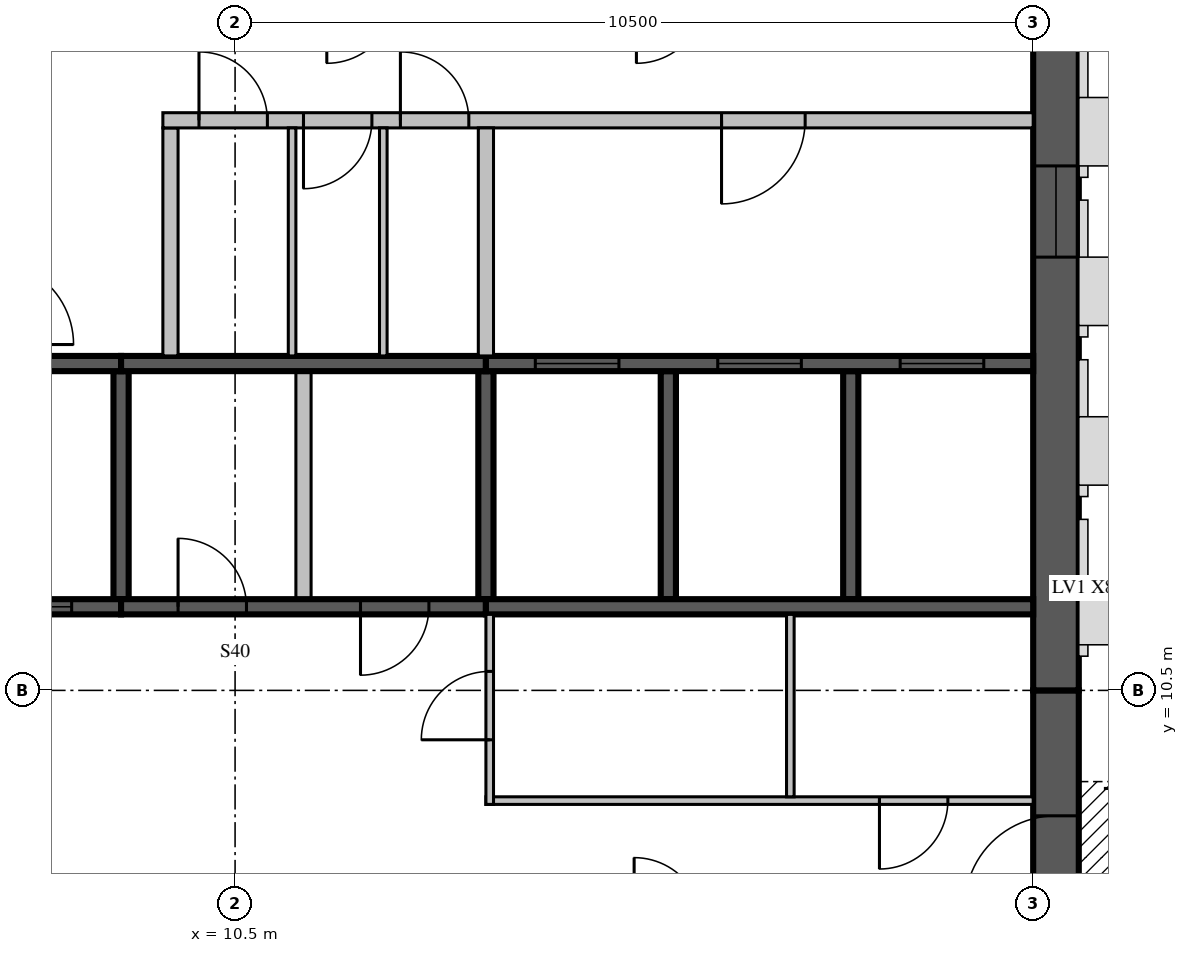
"""IFC4 building model, lengths in metres.
Left out: names, types, materials, properties, quantities, classifications, styles, units other than length and angle.
Written with IfcOpenShell. Run it as: python <this file> out.ifc"""

import sys

from ifc_helpers import new_model, si_unit, direction, frame, frame_2d, origin, place, context, subcontext, project, spatial, rectangle, extrude, source, transform, mapped, element, fill, save


model = new_model("IFC4")
c1 = context("Model", 3, precision=1e-05, world=origin(), true_north=direction((0.0, 1.0)))
c2 = subcontext(c1, "Body", "Model", "MODEL_VIEW")
j1 = project(units=[si_unit("LENGTHUNIT", "METRE"), si_unit("PLANEANGLEUNIT", "RADIAN")], contexts=[c1])
p1 = place(None, origin())
s1 = spatial("IfcSite", under=j1, at=p1, CompositionType="ELEMENT")
p2 = place(p1, origin())
s2 = spatial("IfcBuilding", under=s1, at=p2, CompositionType="ELEMENT")
p3 = place(p2, frame((0.0, 0.0, 295.0)))
s3 = spatial("IfcBuildingStorey", under=s2, at=p3, CompositionType="ELEMENT", Elevation=295.0)
m1 = source(origin(), c2, "Body", "SweptSolid", [
    extrude(rectangle(XDim=6.3, YDim=0.6, at=frame_2d((3.15, 0.0))), origin(), (0.0, 0.0, 1.0), 3.5),
])
p4 = place(p3, frame((21.3, 4.2, 0.0), z_axis=(0.0, 0.0, 1.0), x_axis=(0.0, 1.0, 0.0)))
e1 = element("IfcWall", 1, at=p4, inside=s3, PredefinedType="SHEAR", context=c2, shape_type="MappedRepresentation", body=[
    mapped(m1, transform((0.0, 0.0, 0.0), scale=1.0)),
])
m2 = source(origin(), c2, "Body", "SweptSolid", [
    extrude(rectangle(XDim=1.2, YDim=2.1, at=frame_2d((0.6, 1.05))), frame((0.0, 0.31, 0.0), z_axis=(0.0, -1.0, 0.0), x_axis=(1.0, 0.0, 0.0)), (0.0, 0.0, 1.0), 0.62),
])
p5 = place(p4, frame((3.45, 0.0, 0.0)))
e2 = element("IfcOpeningElement", 2, at=p5, cuts=e1, PredefinedType="OPENING", context=c2, shape_type="MappedRepresentation", body=[
    mapped(m2, transform((0.0, 0.0, 0.0), scale=1.0)),
])
m3 = source(origin(), c2, "Body", "SweptSolid", [
    extrude(rectangle(XDim=10.5, YDim=0.6, at=frame_2d((5.25, 0.0))), origin(), (0.0, 0.0, 1.0), 3.5),
])
p6 = place(p3, frame((21.3, 10.5, 0.0), z_axis=(0.0, 0.0, 1.0), x_axis=(0.0, 1.0, 0.0)))
e3 = element("IfcWall", 3, at=p6, inside=s3, PredefinedType="SHEAR", context=c2, shape_type="MappedRepresentation", body=[
    mapped(m3, transform((0.0, 0.0, 0.0), scale=1.0)),
])
m4 = source(origin(), c2, "Body", "SweptSolid", [
    extrude(rectangle(XDim=1.2, YDim=2.4, at=frame_2d((0.6, 1.2))), frame((0.0, 0.31, 0.0), z_axis=(0.0, -1.0, 0.0), x_axis=(1.0, 0.0, 0.0)), (0.0, 0.0, 1.0), 0.62),
])
p7 = place(p6, frame((5.7, 0.0, 0.6)))
e4 = element("IfcOpeningElement", 4, at=p7, cuts=e3, PredefinedType="OPENING", context=c2, shape_type="MappedRepresentation", body=[
    mapped(m4, transform((0.0, 0.0, 0.0), scale=1.0)),
])
m5 = source(origin(), c2, "Body", "SweptSolid", [
    extrude(rectangle(XDim=3.0, YDim=0.2, at=frame_2d((1.5, 0.0))), origin(), (0.0, 0.0, 1.0), 3.1),
])
for number, where, z_axis, x_axis in (
    (5, (9.0, 11.7, 0.0), (0.0, 0.0, 1.0), (0.0, 1.0, 0.0)),
    (6, (13.8, 11.7, 0.0), (0.0, 0.0, 1.0), (0.0, 1.0, 0.0)),
):
    element("IfcWall", number, at=place(p3, frame(where, z_axis=z_axis, x_axis=x_axis)), inside=s3, PredefinedType="SOLIDWALL", context=c2, shape_type="MappedRepresentation", body=[
        mapped(m5, transform((0.0, 0.0, 0.0), scale=1.0)),
    ])
m6 = source(origin(), c2, "Body", "SweptSolid", [
    extrude(rectangle(XDim=3.0, YDim=0.2, at=frame_2d((1.5, 0.0))), origin(), (0.0, 0.0, 1.0), 3.5),
])
for number, where, z_axis, x_axis in (
    (7, (16.2, 11.7, 0.0), (0.0, 0.0, 1.0), (0.0, 1.0, 0.0)),
    (8, (18.6, 11.7, 0.0), (0.0, 0.0, 1.0), (0.0, 1.0, 0.0)),
):
    element("IfcWall", number, at=place(p3, frame(where, z_axis=z_axis, x_axis=x_axis)), inside=s3, PredefinedType="SOLIDWALL", context=c2, shape_type="MappedRepresentation", body=[
        mapped(m6, transform((0.0, 0.0, 0.0), scale=1.0)),
    ])
m7 = source(origin(), c2, "Body", "SweptSolid", [
    extrude(rectangle(XDim=3.0, YDim=0.2, at=frame_2d((1.5, 0.0))), origin(), (0.0, 0.0, 1.0), 3.1),
])
p8 = place(p3, frame((11.4, 11.7, 0.0), z_axis=(0.0, 0.0, 1.0), x_axis=(0.0, 1.0, 0.0)))
e9 = element("IfcWall", 9, at=p8, inside=s3, PredefinedType="PARTITIONING", context=c2, shape_type="MappedRepresentation", body=[
    mapped(m7, transform((0.0, 0.0, 0.0), scale=1.0)),
])
m8 = source(origin(), c2, "Body", "SweptSolid", [
    extrude(rectangle(XDim=4.8, YDim=0.2, at=frame_2d((2.4, 0.0))), origin(), (0.0, 0.0, 1.0), 3.5),
])
p9 = place(p3, frame((4.2, 11.6, 0.0), z_axis=(0.0, 0.0, 1.0), x_axis=(1.0, 0.0, 0.0)))
e10 = element("IfcWall", 10, at=p9, inside=s3, PredefinedType="SOLIDWALL", context=c2, shape_type="MappedRepresentation", body=[
    mapped(m8, transform((0.0, 0.0, 0.0), scale=1.0)),
])
m9 = source(origin(), c2, "Body", "SweptSolid", [
    extrude(rectangle(XDim=1.1, YDim=2.1, at=frame_2d((0.55, 1.05))), frame((0.0, 0.11, 0.0), z_axis=(0.0, -1.0, 0.0), x_axis=(1.0, 0.0, 0.0)), (0.0, 0.0, 1.0), 0.22),
])
p10 = place(p9, frame((0.65, 0.0, 0.0)))
e11 = element("IfcOpeningElement", 11, at=p10, cuts=e10, PredefinedType="OPENING", context=c2, shape_type="MappedRepresentation", body=[
    mapped(m9, transform((0.0, 0.0, 0.0), scale=1.0)),
])
p11 = place(p9, frame((3.05, 0.0, 0.0)))
e12 = element("IfcOpeningElement", 12, at=p11, cuts=e10, PredefinedType="OPENING", context=c2, shape_type="MappedRepresentation", body=[
    mapped(m9, transform((0.0, 0.0, 0.0), scale=1.0)),
])
m10 = source(origin(), c2, "Body", "SweptSolid", [
    extrude(rectangle(XDim=4.8, YDim=0.2, at=frame_2d((2.4, 0.0))), origin(), (0.0, 0.0, 1.0), 3.1),
])
p12 = place(p3, frame((9.0, 11.6, 0.0), z_axis=(0.0, 0.0, 1.0), x_axis=(1.0, 0.0, 0.0)))
e13 = element("IfcWall", 13, at=p12, inside=s3, PredefinedType="SOLIDWALL", context=c2, shape_type="MappedRepresentation", body=[
    mapped(m10, transform((0.0, 0.0, 0.0), scale=1.0)),
])
m11 = source(origin(), c2, "Body", "SweptSolid", [
    extrude(rectangle(XDim=0.9, YDim=2.1, at=frame_2d((0.45, 1.05))), frame((0.0, 0.11, 0.0), z_axis=(0.0, -1.0, 0.0), x_axis=(1.0, 0.0, 0.0)), (0.0, 0.0, 1.0), 0.22),
])
p13 = place(p12, frame((0.75, 0.0, 0.0)))
e14 = element("IfcOpeningElement", 14, at=p13, cuts=e13, PredefinedType="OPENING", context=c2, shape_type="MappedRepresentation", body=[
    mapped(m11, transform((0.0, 0.0, 0.0), scale=1.0)),
])
p14 = place(p12, frame((3.15, 0.0, 0.0)))
e15 = element("IfcOpeningElement", 15, at=p14, cuts=e13, PredefinedType="OPENING", context=c2, shape_type="MappedRepresentation", body=[
    mapped(m11, transform((0.0, 0.0, 0.0), scale=1.0)),
])
m12 = source(origin(), c2, "Body", "SweptSolid", [
    extrude(rectangle(XDim=7.2, YDim=0.2, at=frame_2d((3.6, 0.0))), origin(), (0.0, 0.0, 1.0), 3.5),
])
p15 = place(p3, frame((13.8, 11.6, 0.0), z_axis=(0.0, 0.0, 1.0), x_axis=(1.0, 0.0, 0.0)))
e16 = element("IfcWall", 16, at=p15, inside=s3, PredefinedType="SOLIDWALL", context=c2, shape_type="MappedRepresentation", body=[
    mapped(m12, transform((0.0, 0.0, 0.0), scale=1.0)),
])
p16 = place(p3, frame((4.2, 14.8, 0.0), z_axis=(0.0, 0.0, 1.0), x_axis=(1.0, 0.0, 0.0)))
e17 = element("IfcWall", 17, at=p16, inside=s3, PredefinedType="SOLIDWALL", context=c2, shape_type="MappedRepresentation", body=[
    mapped(m8, transform((0.0, 0.0, 0.0), scale=1.0)),
])
p17 = place(p3, frame((9.0, 14.8, 0.0), z_axis=(0.0, 0.0, 1.0), x_axis=(1.0, 0.0, 0.0)))
e18 = element("IfcWall", 18, at=p17, inside=s3, PredefinedType="SOLIDWALL", context=c2, shape_type="MappedRepresentation", body=[
    mapped(m10, transform((0.0, 0.0, 0.0), scale=1.0)),
])
p18 = place(p3, frame((13.8, 14.8, 0.0), z_axis=(0.0, 0.0, 1.0), x_axis=(1.0, 0.0, 0.0)))
e19 = element("IfcWall", 19, at=p18, inside=s3, PredefinedType="SOLIDWALL", context=c2, shape_type="MappedRepresentation", body=[
    mapped(m12, transform((0.0, 0.0, 0.0), scale=1.0)),
])
p19 = place(p18, frame((0.65, 0.0, 0.0)))
e20 = element("IfcOpeningElement", 20, at=p19, cuts=e19, PredefinedType="OPENING", context=c2, shape_type="MappedRepresentation", body=[
    mapped(m9, transform((0.0, 0.0, 0.0), scale=1.0)),
])
p20 = place(p18, frame((3.05, 0.0, 0.0)))
e21 = element("IfcOpeningElement", 21, at=p20, cuts=e19, PredefinedType="OPENING", context=c2, shape_type="MappedRepresentation", body=[
    mapped(m9, transform((0.0, 0.0, 0.0), scale=1.0)),
])
p21 = place(p18, frame((5.45, 0.0, 0.0)))
e22 = element("IfcOpeningElement", 22, at=p21, cuts=e19, PredefinedType="OPENING", context=c2, shape_type="MappedRepresentation", body=[
    mapped(m9, transform((0.0, 0.0, 0.0), scale=1.0)),
])
p22 = place(p3, frame((9.65, 14.9, 0.0), z_axis=(0.0, 0.0, 1.0), x_axis=(0.0, 1.0, 0.0)))
e23 = element("IfcWall", 23, at=p22, inside=s3, PredefinedType="PARTITIONING", context=c2, shape_type="MappedRepresentation", body=[
    mapped(m7, transform((0.0, 0.0, 0.0), scale=1.0)),
])
m13 = source(origin(), c2, "Body", "SweptSolid", [
    extrude(rectangle(XDim=11.45, YDim=0.2, at=frame_2d((5.725, 0.0))), origin(), (0.0, 0.0, 1.0), 3.1),
])
p23 = place(p3, frame((9.55, 18.0, 0.0), z_axis=(0.0, 0.0, 1.0), x_axis=(1.0, 0.0, 0.0)))
e24 = element("IfcWall", 24, at=p23, inside=s3, PredefinedType="PARTITIONING", context=c2, shape_type="MappedRepresentation", body=[
    mapped(m13, transform((0.0, 0.0, 0.0), scale=1.0)),
])
p24 = place(p23, frame((0.475, 0.0, 0.0)))
e25 = element("IfcOpeningElement", 25, at=p24, cuts=e24, PredefinedType="OPENING", context=c2, shape_type="MappedRepresentation", body=[
    mapped(m11, transform((0.0, 0.0, 0.0), scale=1.0)),
])
p25 = place(p23, frame((1.85, 0.0, 0.0)))
e26 = element("IfcOpeningElement", 26, at=p25, cuts=e24, PredefinedType="OPENING", context=c2, shape_type="MappedRepresentation", body=[
    mapped(m11, transform((0.0, 0.0, 0.0), scale=1.0)),
])
p26 = place(p23, frame((3.125, 0.0, 0.0)))
e27 = element("IfcOpeningElement", 27, at=p26, cuts=e24, PredefinedType="OPENING", context=c2, shape_type="MappedRepresentation", body=[
    mapped(m11, transform((0.0, 0.0, 0.0), scale=1.0)),
])
p27 = place(p23, frame((7.35, 0.0, 0.0)))
e28 = element("IfcOpeningElement", 28, at=p27, cuts=e24, PredefinedType="OPENING", context=c2, shape_type="MappedRepresentation", body=[
    mapped(m9, transform((0.0, 0.0, 0.0), scale=1.0)),
])
p28 = place(p3, frame((13.8, 9.05, 0.0), z_axis=(0.0, 0.0, 1.0), x_axis=(1.0, 0.0, 0.0)))
e29 = element("IfcWall", 29, at=p28, inside=s3, PredefinedType="PARTITIONING", context=c2, shape_type="SweptSolid", body=[
    extrude(rectangle(XDim=7.2, YDim=0.1, at=frame_2d((3.6, 0.0))), origin(), (0.0, 0.0, 1.0), 3.1),
])
m14 = source(origin(), c2, "Body", "SweptSolid", [
    extrude(rectangle(XDim=0.9, YDim=2.1, at=frame_2d((0.45, 1.05))), frame((0.0, 0.06, 0.0), z_axis=(0.0, -1.0, 0.0), x_axis=(1.0, 0.0, 0.0)), (0.0, 0.0, 1.0), 0.12),
])
p29 = place(p28, frame((5.178, 0.0, 0.0)))
e30 = element("IfcOpeningElement", 30, at=p29, cuts=e29, PredefinedType="OPENING", context=c2, shape_type="MappedRepresentation", body=[
    mapped(m14, transform((0.0, 0.0, 0.0), scale=1.0)),
])
m15 = source(origin(), c2, "Body", "SweptSolid", [
    extrude(rectangle(XDim=2.5, YDim=0.1, at=frame_2d((1.25, 0.0))), origin(), (0.0, 0.0, 1.0), 3.1),
])
p30 = place(p3, frame((13.85, 9.0, 0.0), z_axis=(0.0, 0.0, 1.0), x_axis=(0.0, 1.0, 0.0)))
e31 = element("IfcWall", 31, at=p30, inside=s3, PredefinedType="PARTITIONING", context=c2, shape_type="MappedRepresentation", body=[
    mapped(m15, transform((0.0, 0.0, 0.0), scale=1.0)),
])
p31 = place(p30, frame((0.85, 0.0, 0.0)))
e32 = element("IfcOpeningElement", 32, at=p31, cuts=e31, PredefinedType="OPENING", context=c2, shape_type="MappedRepresentation", body=[
    mapped(m14, transform((0.0, 0.0, 0.0), scale=1.0)),
])
m16 = source(origin(), c2, "Body", "SweptSolid", [
    extrude(rectangle(XDim=2.4, YDim=0.1, at=frame_2d((1.2, 0.0))), origin(), (0.0, 0.0, 1.0), 3.1),
])
p32 = place(p3, frame((17.805, 9.1, 0.0), z_axis=(0.0, 0.0, 1.0), x_axis=(0.0, 1.0, 0.0)))
e33 = element("IfcWall", 33, at=p32, inside=s3, PredefinedType="PARTITIONING", context=c2, shape_type="MappedRepresentation", body=[
    mapped(m16, transform((0.0, 0.0, 0.0), scale=1.0)),
])
p33 = place(p3, frame((13.8, 14.9, 0.0), z_axis=(0.0, 0.0, 1.0), x_axis=(0.0, 1.0, 0.0)))
e34 = element("IfcWall", 34, at=p33, inside=s3, PredefinedType="PARTITIONING", context=c2, shape_type="MappedRepresentation", body=[
    mapped(m7, transform((0.0, 0.0, 0.0), scale=1.0)),
])
m17 = source(origin(), c2, "Body", "SweptSolid", [
    extrude(rectangle(XDim=3.0, YDim=0.1, at=frame_2d((1.5, 0.0))), origin(), (0.0, 0.0, 1.0), 3.1),
])
for number, where, z_axis, x_axis in (
    (35, (11.25, 14.9, 0.0), (0.0, 0.0, 1.0), (0.0, 1.0, 0.0)),
    (36, (12.45, 14.9, 0.0), (0.0, 0.0, 1.0), (0.0, 1.0, 0.0)),
):
    element("IfcWall", number, at=place(p3, frame(where, z_axis=z_axis, x_axis=x_axis)), inside=s3, PredefinedType="PARTITIONING", context=c2, shape_type="MappedRepresentation", body=[
        mapped(m17, transform((0.0, 0.0, 0.0), scale=1.0)),
    ])
m18 = source(origin(), c2, "Body", "SweptSolid", [
    extrude(rectangle(XDim=1.1, YDim=2.1, at=frame_2d((0.55, 1.05))), frame((0.0, 0.025, 0.0), z_axis=(0.0, -1.0, 0.0), x_axis=(1.0, 0.0, 0.0)), (0.0, 0.0, 1.0), 0.05),
])
p34 = place(p11, origin())
e37 = element("IfcDoor", 37, at=p34, inside=s3, OperationType="SLIDING_TO_LEFT", PredefinedType="DOOR", context=c2, shape_type="MappedRepresentation", body=[
    mapped(m18, transform((0.0, 0.0, 0.0), scale=1.0)),
])
fill(e12, e37)
m19 = source(origin(), c2, "Body", "SweptSolid", [
    extrude(rectangle(XDim=0.9, YDim=2.1, at=frame_2d((0.45, 1.05))), frame((0.0, 0.025, 0.0), z_axis=(0.0, -1.0, 0.0), x_axis=(1.0, 0.0, 0.0)), (0.0, 0.0, 1.0), 0.05),
])
p35 = place(p13, origin())
e38 = element("IfcDoor", 38, at=p35, inside=s3, OperationType="SINGLE_SWING_LEFT", PredefinedType="DOOR", context=c2, shape_type="MappedRepresentation", body=[
    mapped(m19, transform((0.0, 0.0, 0.0), scale=1.0)),
])
fill(e14, e38)
p36 = place(p14, origin())
e39 = element("IfcDoor", 39, at=p36, inside=s3, OperationType="SINGLE_SWING_RIGHT", PredefinedType="DOOR", context=c2, shape_type="MappedRepresentation", body=[
    mapped(m19, transform((0.0, 0.0, 0.0), scale=1.0)),
])
fill(e15, e39)
p37 = place(p19, origin())
e40 = element("IfcDoor", 40, at=p37, inside=s3, OperationType="SLIDING_TO_LEFT", PredefinedType="DOOR", context=c2, shape_type="MappedRepresentation", body=[
    mapped(m18, transform((0.0, 0.0, 0.0), scale=1.0)),
])
fill(e20, e40)
p38 = place(p20, origin())
e41 = element("IfcDoor", 41, at=p38, inside=s3, OperationType="SLIDING_TO_LEFT", PredefinedType="DOOR", context=c2, shape_type="MappedRepresentation", body=[
    mapped(m18, transform((0.0, 0.0, 0.0), scale=1.0)),
])
fill(e21, e41)
p39 = place(p21, origin())
e42 = element("IfcDoor", 42, at=p39, inside=s3, OperationType="SLIDING_TO_LEFT", PredefinedType="DOOR", context=c2, shape_type="MappedRepresentation", body=[
    mapped(m18, transform((0.0, 0.0, 0.0), scale=1.0)),
])
fill(e22, e42)
p40 = place(p24, origin())
e43 = element("IfcDoor", 43, at=p40, inside=s3, OperationType="SINGLE_SWING_LEFT", PredefinedType="DOOR", context=c2, shape_type="MappedRepresentation", body=[
    mapped(m19, transform((0.0, 0.0, 0.0), scale=1.0)),
])
fill(e25, e43)
p41 = place(p25, origin())
e44 = element("IfcDoor", 44, at=p41, inside=s3, OperationType="SINGLE_SWING_RIGHT", PredefinedType="DOOR", context=c2, shape_type="MappedRepresentation", body=[
    mapped(m19, transform((0.0, 0.0, 0.0), scale=1.0)),
])
fill(e26, e44)
p42 = place(p26, origin())
e45 = element("IfcDoor", 45, at=p42, inside=s3, OperationType="SINGLE_SWING_LEFT", PredefinedType="DOOR", context=c2, shape_type="MappedRepresentation", body=[
    mapped(m19, transform((0.0, 0.0, 0.0), scale=1.0)),
])
fill(e27, e45)
p43 = place(p27, origin())
e46 = element("IfcDoor", 46, at=p43, inside=s3, OperationType="SINGLE_SWING_RIGHT", PredefinedType="DOOR", context=c2, shape_type="MappedRepresentation", body=[
    mapped(m18, transform((0.0, 0.0, 0.0), scale=1.0)),
])
fill(e28, e46)
p44 = place(p29, origin())
e47 = element("IfcDoor", 47, at=p44, inside=s3, OperationType="SINGLE_SWING_RIGHT", PredefinedType="DOOR", context=c2, shape_type="MappedRepresentation", body=[
    mapped(m19, transform((0.0, 0.0, 0.0), scale=1.0)),
])
fill(e30, e47)
p45 = place(p31, origin())
e48 = element("IfcDoor", 48, at=p45, inside=s3, OperationType="SINGLE_SWING_LEFT", PredefinedType="DOOR", context=c2, shape_type="MappedRepresentation", body=[
    mapped(m19, transform((0.0, 0.0, 0.0), scale=1.0)),
])
fill(e32, e48)
m20 = source(origin(), c2, "Body", "SweptSolid", [
    extrude(rectangle(XDim=1.2, YDim=2.1, at=frame_2d((0.6, 1.05))), frame((0.0, 0.025, 0.0), z_axis=(0.0, -1.0, 0.0), x_axis=(1.0, 0.0, 0.0)), (0.0, 0.0, 1.0), 0.05),
])
p46 = place(p5, origin())
e49 = element("IfcDoor", 49, at=p46, inside=s3, OperationType="SINGLE_SWING_LEFT", PredefinedType="DOOR", context=c2, shape_type="MappedRepresentation", body=[
    mapped(m20, transform((0.0, 0.0, 0.0), scale=1.0)),
])
fill(e2, e49)
m21 = source(origin(), c2, "Body", "SweptSolid", [
    extrude(rectangle(XDim=1.2, YDim=2.4, at=frame_2d((0.6, 1.2))), frame((0.0, 0.03, 0.0), z_axis=(0.0, -1.0, 0.0), x_axis=(1.0, 0.0, 0.0)), (0.0, 0.0, 1.0), 0.06),
])
p47 = place(p7, origin())
e50 = element("IfcWindow", 50, at=p47, inside=s3, PartitioningType="SINGLE_PANEL", PredefinedType="WINDOW", context=c2, shape_type="MappedRepresentation", body=[
    mapped(m21, transform((0.0, 0.0, 0.0), scale=1.0)),
])
fill(e4, e50)
save(model, sys.argv[1])
